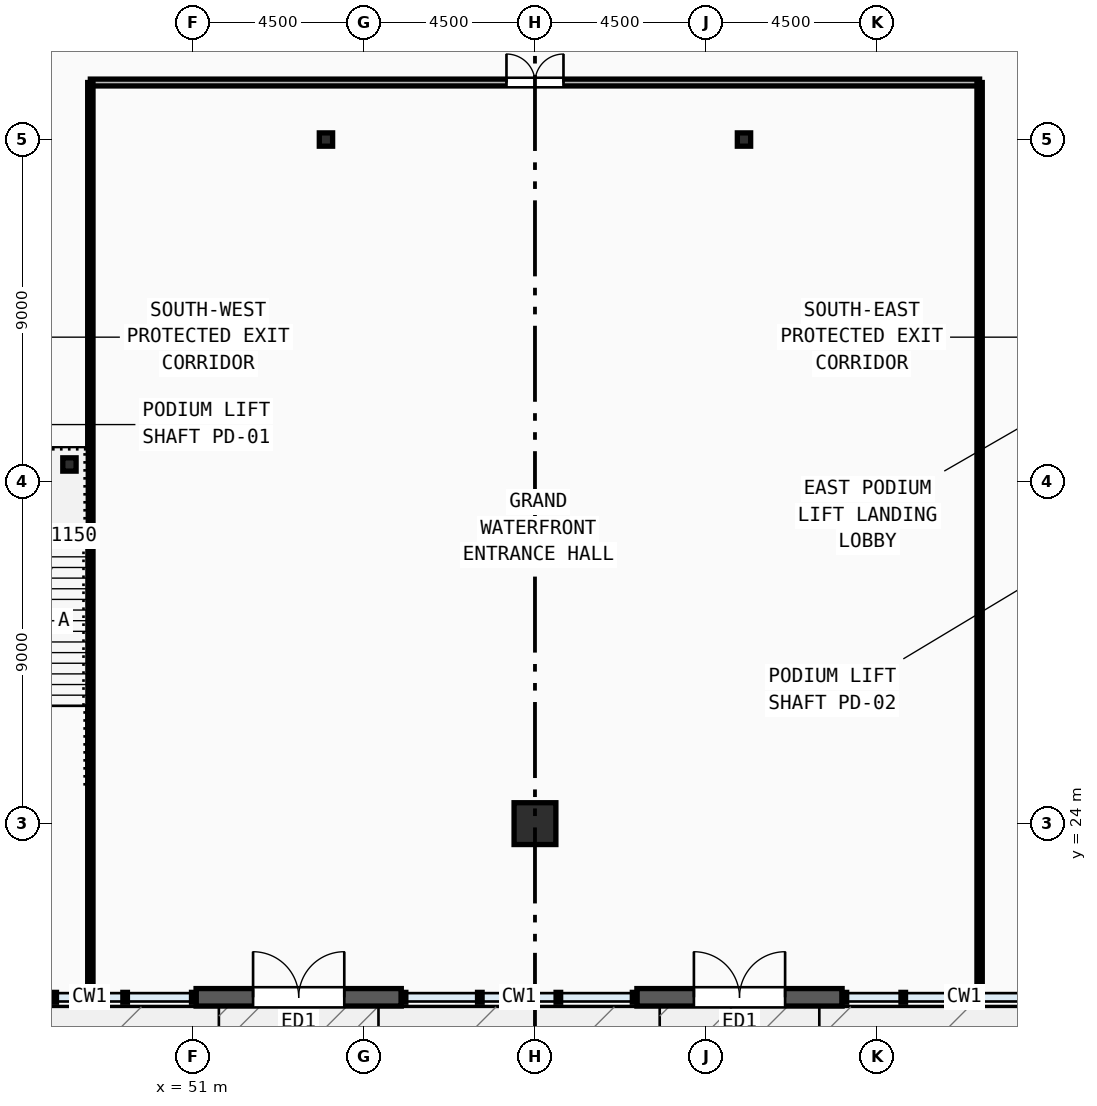
"""IFC4 building model, lengths in metres.
Left out: names, types, materials, properties, quantities, classifications, styles, units other than length and angle.
Written with IfcOpenShell. Run it as: python <this file> out.ifc"""

import sys

from ifc_helpers import new_model, si_unit, direction, frame, frame_2d, origin, origin_2d, place, context, subcontext, project, spatial, rectangle, i_section, extrude, source, transform, mapped, element, fill, save


model = new_model("IFC4")
c1 = context("Model", 3, precision=1e-05, world=origin(), true_north=direction((0.0, 1.0)))
c2 = subcontext(c1, "Body", "Model", "MODEL_VIEW")
j1 = project(units=[si_unit("LENGTHUNIT", "METRE"), si_unit("PLANEANGLEUNIT", "RADIAN")], contexts=[c1])
p1 = place(None, origin())
s1 = spatial("IfcSite", under=j1, at=p1, CompositionType="ELEMENT")
p2 = place(p1, origin())
s2 = spatial("IfcBuilding", under=s1, at=p2, CompositionType="ELEMENT")
p3 = place(p2, origin())
s3 = spatial("IfcBuildingStorey", under=s2, at=p3, CompositionType="ELEMENT", Elevation=0.0)
m1 = source(origin(), c2, "Body", "SweptSolid", [
    extrude(rectangle(XDim=1.1, YDim=1.1, at=origin_2d()), origin(), (0.0, 0.0, 1.0), 5.4),
])
p4 = place(p3, frame((60.0, 24.0, 0.0), z_axis=(0.0, 0.0, 1.0), x_axis=(1.0, 0.0, 0.0)))
e1 = element("IfcColumn", 1, at=p4, inside=s3, PredefinedType="COLUMN", context=c2, shape_type="MappedRepresentation", body=[
    mapped(m1, transform((0.0, 0.0, 0.0), x_axis=(1.0, 0.0, 0.0), y_axis=(0.0, 1.0, 0.0), z_axis=(0.0, 0.0, 1.0), scale=1.0)),
])
m2 = source(origin(), c2, "Body", "SweptSolid", [
    extrude(i_section(OverallWidth=0.35, OverallDepth=0.35, WebThickness=0.012, FlangeThickness=0.019, at=origin_2d()), origin(), (0.0, 0.0, 1.0), 5.4),
])
for number, where, z_axis, x_axis in (
    (2, (54.5, 42.0, 0.0), (0.0, 0.0, 1.0), (1.0, 0.0, 0.0)),
    (3, (65.5, 42.0, 0.0), (0.0, 0.0, 1.0), (1.0, 0.0, 0.0)),
    (4, (47.75, 33.45, 0.0), (0.0, 0.0, 1.0), (1.0, 0.0, 0.0)),
):
    element("IfcColumn", number, at=place(p3, frame(where, z_axis=z_axis, x_axis=x_axis)), inside=s3, PredefinedType="COLUMN", context=c2, shape_type="MappedRepresentation", body=[
        mapped(m2, transform((0.0, 0.0, 0.0), x_axis=(1.0, 0.0, 0.0), y_axis=(0.0, 1.0, 0.0), z_axis=(0.0, 0.0, 1.0), scale=1.0)),
    ])
p5 = place(p3, frame((51.082, 19.43, 0.0), z_axis=(0.0, 0.0, 1.0), x_axis=(1.0, 0.0, 0.0)))
e5 = element("IfcWall", 5, at=p5, inside=s3, PredefinedType="SOLIDWALL", context=c2, shape_type="SweptSolid", body=[
    extrude(rectangle(XDim=5.4, YDim=0.46, at=frame_2d((2.7, 0.0))), origin(), (0.0, 0.0, 1.0), 5.15),
])
m3 = source(origin(), c2, "Body", "SweptSolid", [
    extrude(rectangle(XDim=2.4, YDim=2.7, at=frame_2d((1.2, 1.35))), frame((0.0, 0.24, 0.0), z_axis=(0.0, -1.0, 0.0), x_axis=(1.0, 0.0, 0.0)), (0.0, 0.0, 1.0), 0.48),
])
p6 = place(p5, frame((1.5, 0.0, 0.0)))
e6 = element("IfcOpeningElement", 6, at=p6, cuts=e5, PredefinedType="OPENING", context=c2, shape_type="MappedRepresentation", body=[
    mapped(m3, transform((0.0, 0.0, 0.0), x_axis=(1.0, 0.0, 0.0), y_axis=(0.0, 1.0, 0.0), z_axis=(0.0, 0.0, 1.0), scale=1.0)),
])
p7 = place(p3, frame((62.682, 19.43, 0.0), z_axis=(0.0, 0.0, 1.0), x_axis=(1.0, 0.0, 0.0)))
e7 = element("IfcWall", 7, at=p7, inside=s3, PredefinedType="SOLIDWALL", context=c2, shape_type="SweptSolid", body=[
    extrude(rectangle(XDim=5.4, YDim=0.46, at=frame_2d((2.7, 0.0))), origin(), (0.0, 0.0, 1.0), 5.15),
])
p8 = place(p7, frame((1.5, 0.0, 0.0)))
e8 = element("IfcOpeningElement", 8, at=p8, cuts=e7, PredefinedType="OPENING", context=c2, shape_type="MappedRepresentation", body=[
    mapped(m3, transform((0.0, 0.0, 0.0), x_axis=(1.0, 0.0, 0.0), y_axis=(0.0, 1.0, 0.0), z_axis=(0.0, 0.0, 1.0), scale=1.0)),
])
p9 = place(p3, frame((48.3, 43.5, 0.0), z_axis=(0.0, 0.0, 1.0), x_axis=(1.0, 0.0, 0.0)))
e9 = element("IfcWall", 9, at=p9, inside=s3, PredefinedType="PARTITIONING", context=c2, shape_type="SweptSolid", body=[
    extrude(rectangle(XDim=23.4, YDim=0.18, at=frame_2d((11.7, 0.0))), origin(), (0.0, 0.0, 1.0), 5.15),
])
m4 = source(origin(), c2, "Body", "SweptSolid", [
    extrude(rectangle(XDim=1.5, YDim=2.2, at=frame_2d((0.75, 1.1))), frame((0.0, 0.1, 0.0), z_axis=(0.0, -1.0, 0.0), x_axis=(1.0, 0.0, 0.0)), (0.0, 0.0, 1.0), 0.2),
])
p10 = place(p9, frame((10.95, 0.0, 0.0)))
e10 = element("IfcOpeningElement", 10, at=p10, cuts=e9, PredefinedType="OPENING", context=c2, shape_type="MappedRepresentation", body=[
    mapped(m4, transform((0.0, 0.0, 0.0), x_axis=(1.0, 0.0, 0.0), y_axis=(0.0, 1.0, 0.0), z_axis=(0.0, 0.0, 1.0), scale=1.0)),
])
for number, where, z_axis, x_axis in (
    (11, (48.3, 19.425, 0.0), (0.0, 0.0, 1.0), (0.0, 1.0, 0.0)),
    (12, (71.7, 19.425, 0.0), (0.0, 0.0, 1.0), (0.0, 1.0, 0.0)),
):
    element("IfcWall", number, at=place(p3, frame(where, z_axis=z_axis, x_axis=x_axis)), inside=s3, PredefinedType="PARTITIONING", context=c2, shape_type="SweptSolid", body=[
        extrude(rectangle(XDim=24.075, YDim=0.14, at=frame_2d((12.038, 0.0))), origin(), (0.0, 0.0, 1.0), 5.15),
    ])
m5 = source(origin(), c2, "Body", "SweptSolid", [
    extrude(rectangle(XDim=2.4, YDim=2.7, at=frame_2d((1.2, 1.35))), frame((0.0, 0.025, 0.0), z_axis=(0.0, -1.0, 0.0), x_axis=(1.0, 0.0, 0.0)), (0.0, 0.0, 1.0), 0.05),
])
p11 = place(p6, frame((2.4, 0.0, 0.0), z_axis=(0.0, 0.0, 1.0), x_axis=(-1.0, 0.0, 0.0)))
e13 = element("IfcDoor", 13, at=p11, inside=s3, OperationType="DOUBLE_DOOR_SINGLE_SWING", PredefinedType="DOOR", context=c2, shape_type="MappedRepresentation", body=[
    mapped(m5, transform((0.0, 0.0, 0.0), x_axis=(1.0, 0.0, 0.0), y_axis=(0.0, 1.0, 0.0), z_axis=(0.0, 0.0, 1.0), scale=1.0)),
])
fill(e6, e13)
p12 = place(p8, frame((2.4, 0.0, 0.0), z_axis=(0.0, 0.0, 1.0), x_axis=(-1.0, 0.0, 0.0)))
e14 = element("IfcDoor", 14, at=p12, inside=s3, OperationType="DOUBLE_DOOR_SINGLE_SWING", PredefinedType="DOOR", context=c2, shape_type="MappedRepresentation", body=[
    mapped(m5, transform((0.0, 0.0, 0.0), x_axis=(1.0, 0.0, 0.0), y_axis=(0.0, 1.0, 0.0), z_axis=(0.0, 0.0, 1.0), scale=1.0)),
])
fill(e8, e14)
m6 = source(origin(), c2, "Body", "SweptSolid", [
    extrude(rectangle(XDim=1.5, YDim=2.2, at=frame_2d((0.75, 1.1))), frame((0.0, 0.025, 0.0), z_axis=(0.0, -1.0, 0.0), x_axis=(1.0, 0.0, 0.0)), (0.0, 0.0, 1.0), 0.05),
])
p13 = place(p10, origin())
e15 = element("IfcDoor", 15, at=p13, inside=s3, OperationType="DOUBLE_DOOR_SINGLE_SWING", PredefinedType="DOOR", context=c2, shape_type="MappedRepresentation", body=[
    mapped(m6, transform((0.0, 0.0, 0.0), x_axis=(1.0, 0.0, 0.0), y_axis=(0.0, 1.0, 0.0), z_axis=(0.0, 0.0, 1.0), scale=1.0)),
])
fill(e10, e15)
save(model, sys.argv[1])
